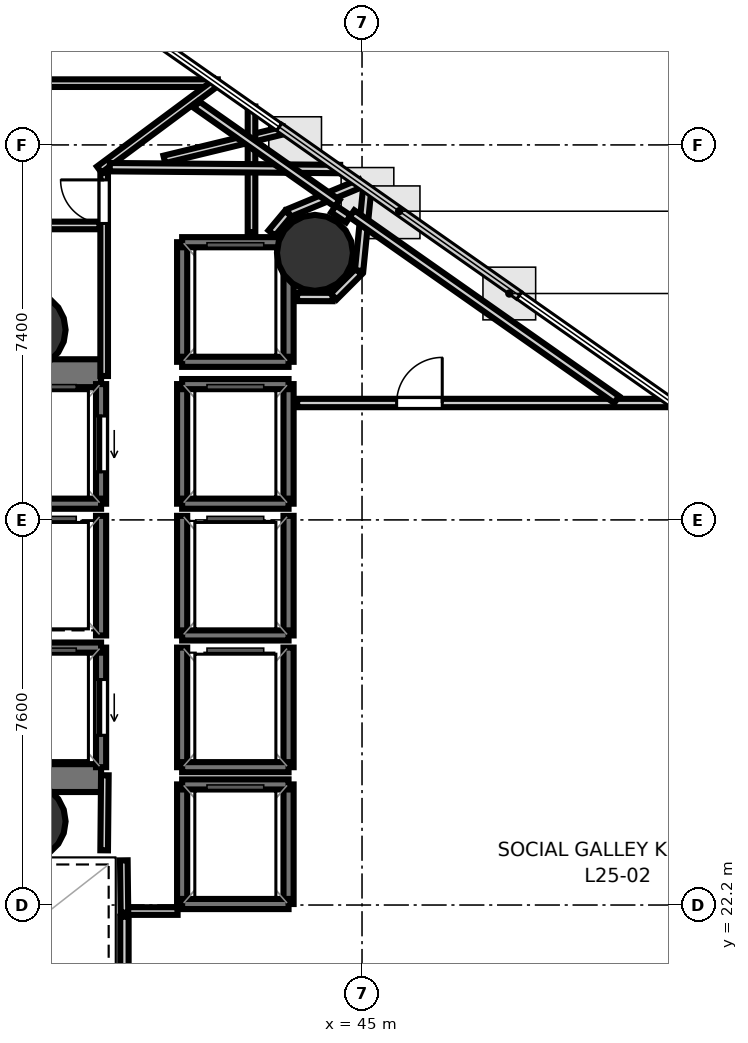
"""IFC4 building model, lengths in metres.
Left out: names, types, materials, properties, quantities, classifications, styles, units other than length and angle.
Written with IfcOpenShell. Run it as: python <this file> out.ifc"""

import sys

from ifc_helpers import new_model, si_unit, direction, frame, frame_2d, origin, origin_2d, place, context, subcontext, project, spatial, rectangle, hollow_circle, extrude, element, fill, save


model = new_model("IFC4")
c1 = context("Model", 3, precision=1e-05, world=origin(), true_north=direction((0.0, 1.0)))
c2 = subcontext(c1, "Body", "Model", "MODEL_VIEW")
j1 = project(units=[si_unit("LENGTHUNIT", "METRE"), si_unit("PLANEANGLEUNIT", "RADIAN")], contexts=[c1])
p1 = place(None, origin())
s1 = spatial("IfcSite", under=j1, at=p1, CompositionType="ELEMENT")
p2 = place(p1, origin())
s2 = spatial("IfcBuilding", under=s1, at=p2, CompositionType="ELEMENT")
p3 = place(p2, frame((0.0, 0.0, 101.5)))
s3 = spatial("IfcBuildingStorey", under=s2, at=p3, CompositionType="ELEMENT", Elevation=101.5)
p4 = place(p3, frame((29.23, 32.695, 0.0), z_axis=(0.0, 0.0, 1.0), x_axis=(1.0, 0.0, 0.0)))
e1 = element("IfcWall", 1, at=p4, inside=s3, PredefinedType="SHEAR", context=c2, shape_type="SweptSolid", body=[
    extrude(rectangle(XDim=10.62, YDim=0.55, at=frame_2d((5.31, 0.0))), origin(), (0.0, 0.0, 1.0), 3.52),
])
p5 = place(p4, frame((0.995, 0.0, 0.0)))
e2 = element("IfcOpeningElement", 2, at=p5, cuts=e1, PredefinedType="OPENING", context=c2, shape_type="SweptSolid", body=[
    extrude(rectangle(XDim=1.25, YDim=2.15, at=frame_2d((0.625, 1.075))), frame((0.0, 0.285, 0.0), z_axis=(0.0, -1.0, 0.0), x_axis=(1.0, 0.0, 0.0)), (0.0, 0.0, 1.0), 0.57),
])
p6 = place(p3, frame((29.23, 24.705, 0.0), z_axis=(0.0, 0.0, 1.0), x_axis=(1.0, 0.0, 0.0)))
e3 = element("IfcWall", 3, at=p6, inside=s3, PredefinedType="SHEAR", context=c2, shape_type="SweptSolid", body=[
    extrude(rectangle(XDim=10.62, YDim=0.55, at=frame_2d((5.31, 0.0))), origin(), (0.0, 0.0, 1.0), 3.52),
])
p7 = place(p6, frame((0.795, 0.0, 0.0)))
e4 = element("IfcOpeningElement", 4, at=p7, cuts=e3, PredefinedType="OPENING", context=c2, shape_type="SweptSolid", body=[
    extrude(rectangle(XDim=1.25, YDim=2.15, at=frame_2d((0.625, 1.075))), frame((0.0, 0.285, 0.0), z_axis=(0.0, -1.0, 0.0), x_axis=(1.0, 0.0, 0.0)), (0.0, 0.0, 1.0), 0.57),
])
for number, where, z_axis, x_axis in (
    (5, (38.4, 33.55, 0.0), (0.0, 0.0, 1.0), (1.0, 0.0, 0.0)),
    (6, (38.4, 23.85, 0.0), (0.0, 0.0, 1.0), (1.0, 0.0, 0.0)),
    (7, (44.071, 35.07, 0.0), (0.0, 0.0, 1.0), (1.0, 0.0, 0.0)),
):
    element("IfcColumn", number, at=place(p3, frame(where, z_axis=z_axis, x_axis=x_axis)), inside=s3, PredefinedType="COLUMN", context=c2, shape_type="SweptSolid", body=[
        extrude(hollow_circle(Radius=0.75, WallThickness=0.036, at=origin_2d()), origin(), (0.0, 0.0, 1.0), 3.7),
    ])
p8 = place(p3, frame((39.85, 30.12, 0.0), z_axis=(0.0, 0.0, 1.0), x_axis=(0.0, 1.0, 0.0)))
e8 = element("IfcWall", 8, at=p8, inside=s3, PredefinedType="SOLIDWALL", context=c2, shape_type="SweptSolid", body=[
    extrude(rectangle(XDim=2.36, YDim=0.2, at=frame_2d((1.18, 0.0))), origin(), (0.0, 0.0, 1.0), 3.52),
])
p9 = place(p8, frame((0.63, 0.0, 0.0)))
e9 = element("IfcOpeningElement", 9, at=p9, cuts=e8, PredefinedType="OPENING", context=c2, shape_type="SweptSolid", body=[
    extrude(rectangle(XDim=1.1, YDim=2.15, at=frame_2d((0.55, 1.075))), frame((0.0, 0.11, 0.0), z_axis=(0.0, -1.0, 0.0), x_axis=(1.0, 0.0, 0.0)), (0.0, 0.0, 1.0), 0.22),
])
p10 = place(p3, frame((37.75, 30.12, 0.0), z_axis=(0.0, 0.0, 1.0), x_axis=(1.0, 0.0, 0.0)))
e10 = element("IfcWall", 10, at=p10, inside=s3, PredefinedType="SOLIDWALL", context=c2, shape_type="SweptSolid", body=[
    extrude(rectangle(XDim=2.1, YDim=0.2, at=frame_2d((1.05, 0.0))), origin(), (0.0, 0.0, 1.0), 3.52),
])
p11 = place(p3, frame((39.85, 24.92, 0.0), z_axis=(0.0, 0.0, 1.0), x_axis=(0.0, 1.0, 0.0)))
e11 = element("IfcWall", 11, at=p11, inside=s3, PredefinedType="SOLIDWALL", context=c2, shape_type="SweptSolid", body=[
    extrude(rectangle(XDim=2.36, YDim=0.2, at=frame_2d((1.18, 0.0))), origin(), (0.0, 0.0, 1.0), 3.52),
])
p12 = place(p11, frame((0.63, 0.0, 0.0)))
e12 = element("IfcOpeningElement", 12, at=p12, cuts=e11, PredefinedType="OPENING", context=c2, shape_type="SweptSolid", body=[
    extrude(rectangle(XDim=1.1, YDim=2.15, at=frame_2d((0.55, 1.075))), frame((0.0, 0.11, 0.0), z_axis=(0.0, -1.0, 0.0), x_axis=(1.0, 0.0, 0.0)), (0.0, 0.0, 1.0), 0.22),
])
p13 = place(p3, frame((37.75, 27.28, 0.0), z_axis=(0.0, 0.0, 1.0), x_axis=(1.0, 0.0, 0.0)))
e13 = element("IfcWall", 13, at=p13, inside=s3, PredefinedType="SOLIDWALL", context=c2, shape_type="SweptSolid", body=[
    extrude(rectangle(XDim=2.1, YDim=0.2, at=frame_2d((1.05, 0.0))), origin(), (0.0, 0.0, 1.0), 3.52),
])
for number, where, z_axis, x_axis in (
    (14, (43.55, 30.12, 0.0), (0.0, 0.0, 1.0), (0.0, 1.0, 0.0)),
    (15, (41.45, 30.12, 0.0), (0.0, 0.0, 1.0), (0.0, 1.0, 0.0)),
):
    element("IfcWall", number, at=place(p3, frame(where, z_axis=z_axis, x_axis=x_axis)), inside=s3, PredefinedType="SOLIDWALL", context=c2, shape_type="SweptSolid", body=[
        extrude(rectangle(XDim=2.36, YDim=0.2, at=frame_2d((1.18, 0.0))), origin(), (0.0, 0.0, 1.0), 3.52),
    ])
for number, where, z_axis, x_axis in (
    (16, (41.45, 32.48, 0.0), (0.0, 0.0, 1.0), (1.0, 0.0, 0.0)),
    (17, (41.45, 30.12, 0.0), (0.0, 0.0, 1.0), (1.0, 0.0, 0.0)),
):
    element("IfcWall", number, at=place(p3, frame(where, z_axis=z_axis, x_axis=x_axis)), inside=s3, PredefinedType="SOLIDWALL", context=c2, shape_type="SweptSolid", body=[
        extrude(rectangle(XDim=2.1, YDim=0.2, at=frame_2d((1.05, 0.0))), origin(), (0.0, 0.0, 1.0), 3.52),
    ])
for number, where, z_axis, x_axis in (
    (18, (43.55, 27.52, 0.0), (0.0, 0.0, 1.0), (0.0, 1.0, 0.0)),
    (19, (41.45, 27.52, 0.0), (0.0, 0.0, 1.0), (0.0, 1.0, 0.0)),
):
    element("IfcWall", number, at=place(p3, frame(where, z_axis=z_axis, x_axis=x_axis)), inside=s3, PredefinedType="SOLIDWALL", context=c2, shape_type="SweptSolid", body=[
        extrude(rectangle(XDim=2.36, YDim=0.2, at=frame_2d((1.18, 0.0))), origin(), (0.0, 0.0, 1.0), 3.52),
    ])
p14 = place(p3, frame((41.45, 27.52, 0.0), z_axis=(0.0, 0.0, 1.0), x_axis=(1.0, 0.0, 0.0)))
e20 = element("IfcWall", 20, at=p14, inside=s3, PredefinedType="SOLIDWALL", context=c2, shape_type="SweptSolid", body=[
    extrude(rectangle(XDim=2.1, YDim=0.2, at=frame_2d((1.05, 0.0))), origin(), (0.0, 0.0, 1.0), 3.52),
])
for number, where, z_axis, x_axis in (
    (21, (43.55, 24.92, 0.0), (0.0, 0.0, 1.0), (0.0, 1.0, 0.0)),
    (22, (41.45, 24.92, 0.0), (0.0, 0.0, 1.0), (0.0, 1.0, 0.0)),
):
    element("IfcWall", number, at=place(p3, frame(where, z_axis=z_axis, x_axis=x_axis)), inside=s3, PredefinedType="SOLIDWALL", context=c2, shape_type="SweptSolid", body=[
        extrude(rectangle(XDim=2.36, YDim=0.2, at=frame_2d((1.18, 0.0))), origin(), (0.0, 0.0, 1.0), 3.52),
    ])
p15 = place(p3, frame((41.45, 24.92, 0.0), z_axis=(0.0, 0.0, 1.0), x_axis=(1.0, 0.0, 0.0)))
e23 = element("IfcWall", 23, at=p15, inside=s3, PredefinedType="SOLIDWALL", context=c2, shape_type="SweptSolid", body=[
    extrude(rectangle(XDim=2.1, YDim=0.2, at=frame_2d((1.05, 0.0))), origin(), (0.0, 0.0, 1.0), 3.52),
])
p16 = place(p3, frame((39.85, 27.52, 0.0), z_axis=(0.0, 0.0, 1.0), x_axis=(0.0, 1.0, 0.0)))
e24 = element("IfcWall", 24, at=p16, inside=s3, PredefinedType="SOLIDWALL", context=c2, shape_type="SweptSolid", body=[
    extrude(rectangle(XDim=2.36, YDim=0.2, at=frame_2d((1.18, 0.0))), origin(), (0.0, 0.0, 1.0), 3.52),
])
for number, where, z_axis, x_axis in (
    (25, (43.55, 22.22, 0.0), (0.0, 0.0, 1.0), (0.0, 1.0, 0.0)),
    (26, (41.45, 22.22, 0.0), (0.0, 0.0, 1.0), (0.0, 1.0, 0.0)),
):
    element("IfcWall", number, at=place(p3, frame(where, z_axis=z_axis, x_axis=x_axis)), inside=s3, PredefinedType="SOLIDWALL", context=c2, shape_type="SweptSolid", body=[
        extrude(rectangle(XDim=2.36, YDim=0.2, at=frame_2d((1.18, 0.0))), origin(), (0.0, 0.0, 1.0), 3.52),
    ])
for number, where, z_axis, x_axis in (
    (27, (41.45, 24.58, 0.0), (0.0, 0.0, 1.0), (1.0, 0.0, 0.0)),
    (28, (41.45, 22.22, 0.0), (0.0, 0.0, 1.0), (1.0, 0.0, 0.0)),
):
    element("IfcWall", number, at=place(p3, frame(where, z_axis=z_axis, x_axis=x_axis)), inside=s3, PredefinedType="SOLIDWALL", context=c2, shape_type="SweptSolid", body=[
        extrude(rectangle(XDim=2.1, YDim=0.2, at=frame_2d((1.05, 0.0))), origin(), (0.0, 0.0, 1.0), 3.52),
    ])
for number, where, z_axis, x_axis in (
    (29, (43.55, 32.92, 0.0), (0.0, 0.0, 1.0), (0.0, 1.0, 0.0)),
    (30, (41.45, 32.92, 0.0), (0.0, 0.0, 1.0), (0.0, 1.0, 0.0)),
):
    element("IfcWall", number, at=place(p3, frame(where, z_axis=z_axis, x_axis=x_axis)), inside=s3, PredefinedType="SOLIDWALL", context=c2, shape_type="SweptSolid", body=[
        extrude(rectangle(XDim=2.36, YDim=0.2, at=frame_2d((1.18, 0.0))), origin(), (0.0, 0.0, 1.0), 3.52),
    ])
for number, where, z_axis, x_axis in (
    (31, (41.45, 35.28, 0.0), (0.0, 0.0, 1.0), (1.0, 0.0, 0.0)),
    (32, (41.45, 32.92, 0.0), (0.0, 0.0, 1.0), (1.0, 0.0, 0.0)),
):
    element("IfcWall", number, at=place(p3, frame(where, z_axis=z_axis, x_axis=x_axis)), inside=s3, PredefinedType="SOLIDWALL", context=c2, shape_type="SweptSolid", body=[
        extrude(rectangle(XDim=2.1, YDim=0.2, at=frame_2d((1.05, 0.0))), origin(), (0.0, 0.0, 1.0), 3.52),
    ])
p17 = place(p3, frame((39.911, 32.64, 0.0), z_axis=(0.0, 0.0, 1.0), x_axis=(0.0, 1.0, 0.0)))
e33 = element("IfcWall", 33, at=p17, inside=s3, PredefinedType="PARTITIONING", context=c2, shape_type="SweptSolid", body=[
    extrude(rectangle(XDim=4.01, YDim=0.15, at=frame_2d((2.005, 0.0))), origin(), (0.0, 0.0, 1.0), 2.84),
])
p18 = place(p17, frame((3.01, 0.0, 0.0)))
e34 = element("IfcOpeningElement", 34, at=p18, cuts=e33, PredefinedType="OPENING", context=c2, shape_type="SweptSolid", body=[
    extrude(rectangle(XDim=0.86, YDim=2.05, at=frame_2d((0.43, 1.025))), frame((0.0, 0.085, 0.0), z_axis=(0.0, -1.0, 0.0), x_axis=(1.0, 0.0, 0.0)), (0.0, 0.0, 1.0), 0.17),
])
p19 = place(p3, frame((41.099, 36.915, 0.0), z_axis=(0.0, 0.0, 1.0), x_axis=(0.971792208063, 0.235838725295, 0.0)))
e35 = element("IfcWall", 35, at=p19, inside=s3, PredefinedType="PARTITIONING", context=c2, shape_type="SweptSolid", body=[
    extrude(rectangle(XDim=2.43, YDim=0.15, at=frame_2d((1.215, 0.0))), origin(), (0.0, 0.0, 1.0), 2.84),
])
p20 = place(p3, frame((42.819, 37.958, 0.0), z_axis=(0.0, 0.0, 1.0), x_axis=(0.0, -1.0, 0.0)))
e36 = element("IfcWall", 36, at=p20, inside=s3, PredefinedType="PARTITIONING", context=c2, shape_type="SweptSolid", body=[
    extrude(rectangle(XDim=2.478, YDim=0.15, at=frame_2d((1.239, 0.0))), origin(), (0.0, 0.0, 1.0), 2.84),
])
p21 = place(p3, frame((41.36, 22.081, 0.0), z_axis=(0.0, 0.0, 1.0), x_axis=(-1.0, 0.0, 0.0)))
e37 = element("IfcWall", 37, at=p21, inside=s3, PredefinedType="PARTITIONING", context=c2, shape_type="SweptSolid", body=[
    extrude(rectangle(XDim=1.08, YDim=0.15, at=frame_2d((0.54, 0.0))), origin(), (0.0, 0.0, 1.0), 2.84),
])
p22 = place(p3, frame((40.311, 22.05, 0.0), z_axis=(0.0, 0.0, 1.0), x_axis=(-0.011836292006, 0.999929948642, 0.0)))
e38 = element("IfcWall", 38, at=p22, inside=s3, PredefinedType="PARTITIONING", context=c2, shape_type="SweptSolid", body=[
    extrude(rectangle(XDim=1.031, YDim=0.15, at=frame_2d((0.516, 0.0))), origin(), (0.0, 0.0, 1.0), 2.84),
])
p23 = place(p3, frame((39.911, 23.28, 0.0), z_axis=(0.0, 0.0, 1.0), x_axis=(0.009397771291, 0.999955839972, 0.0)))
e39 = element("IfcWall", 39, at=p23, inside=s3, PredefinedType="PARTITIONING", context=c2, shape_type="SweptSolid", body=[
    extrude(rectangle(XDim=1.481, YDim=0.15, at=frame_2d((0.74, 0.0))), origin(), (0.0, 0.0, 1.0), 2.84),
])
p24 = place(p3, frame((26.42, 38.419, 0.0), z_axis=(0.0, 0.0, 1.0), x_axis=(1.0, 0.0, 0.0)))
e40 = element("IfcWall", 40, at=p24, inside=s3, PredefinedType="PARTITIONING", context=c2, shape_type="SweptSolid", body=[
    extrude(rectangle(XDim=15.734, YDim=0.15, at=frame_2d((7.867, 0.0))), origin(), (0.0, 0.0, 1.0), 2.84),
])
p25 = place(p24, frame((7.13, 0.0, 0.0)))
e41 = element("IfcOpeningElement", 41, at=p25, cuts=e40, PredefinedType="OPENING", context=c2, shape_type="SweptSolid", body=[
    extrude(rectangle(XDim=0.9, YDim=2.1, at=frame_2d((0.45, 1.05))), frame((0.0, 0.085, 0.0), z_axis=(0.0, -1.0, 0.0), x_axis=(1.0, 0.0, 0.0)), (0.0, 0.0, 1.0), 0.17),
])
p26 = place(p3, frame((42.137, 38.44, 0.0), z_axis=(0.0, 0.0, 1.0), x_axis=(-0.802715001133, -0.596362831635, 0.0)))
e42 = element("IfcWall", 42, at=p26, inside=s3, PredefinedType="PARTITIONING", context=c2, shape_type="SweptSolid", body=[
    extrude(rectangle(XDim=2.894, YDim=0.15, at=frame_2d((1.447, 0.0))), origin(), (0.0, 0.0, 1.0), 2.84),
])
p27 = place(p3, frame((39.818, 35.611, 0.0), z_axis=(0.0, 0.0, 1.0), x_axis=(-1.0, 0.0, 0.0)))
e43 = element("IfcWall", 43, at=p27, inside=s3, PredefinedType="PARTITIONING", context=c2, shape_type="SweptSolid", body=[
    extrude(rectangle(XDim=2.768, YDim=0.15, at=frame_2d((1.384, 0.0))), origin(), (0.0, 0.0, 1.0), 2.84),
])
p28 = place(p3, frame((40.311, 18.0, 0.0), z_axis=(0.0, 0.0, 1.0), x_axis=(0.0, 1.0, 0.0)))
e44 = element("IfcWall", 44, at=p28, inside=s3, PredefinedType="PLUMBINGWALL", context=c2, shape_type="SweptSolid", body=[
    extrude(rectangle(XDim=3.97, YDim=0.165, at=frame_2d((1.985, 0.0))), origin(), (0.0, 0.0, 1.0), 2.84),
])
p29 = place(p3, frame((43.72, 32.107, 0.0), z_axis=(0.0, 0.0, 1.0), x_axis=(1.0, 0.0, 0.0)))
e45 = element("IfcWall", 45, at=p29, inside=s3, PredefinedType="PLUMBINGWALL", context=c2, shape_type="SweptSolid", body=[
    extrude(rectangle(XDim=7.424, YDim=0.165, at=frame_2d((3.712, 0.0))), origin(), (0.0, 0.0, 1.0), 2.84),
])
p30 = place(p29, frame((1.963, 0.0, 0.0)))
e46 = element("IfcOpeningElement", 46, at=p30, cuts=e45, PredefinedType="OPENING", context=c2, shape_type="SweptSolid", body=[
    extrude(rectangle(XDim=0.9, YDim=2.1, at=frame_2d((0.45, 1.05))), frame((0.0, 0.093, 0.0), z_axis=(0.0, -1.0, 0.0), x_axis=(1.0, 0.0, 0.0)), (0.0, 0.0, 1.0), 0.185),
])
p31 = place(p3, frame((43.718, 34.201, 0.0), z_axis=(0.0, 0.0, 1.0), x_axis=(0.999993938262, -0.003481873044, 0.0)))
e47 = element("IfcWall", 47, at=p31, inside=s3, PredefinedType="PLUMBINGWALL", context=c2, shape_type="SweptSolid", body=[
    extrude(rectangle(XDim=0.701, YDim=0.165, at=frame_2d((0.351, 0.0))), origin(), (0.0, 0.0, 1.0), 2.84),
])
p32 = place(p3, frame((44.441, 34.207, 0.0), z_axis=(0.0, 0.0, 1.0), x_axis=(0.707106781187, 0.707106781187, 0.0)))
e48 = element("IfcWall", 48, at=p32, inside=s3, PredefinedType="PLUMBINGWALL", context=c2, shape_type="SweptSolid", body=[
    extrude(rectangle(XDim=0.696, YDim=0.165, at=frame_2d((0.348, 0.0))), origin(), (0.0, 0.0, 1.0), 2.84),
])
p33 = place(p3, frame((44.943, 34.719, 0.0), z_axis=(0.0, 0.0, 1.0), x_axis=(0.09801847971, 0.995184594754, 0.0)))
e49 = element("IfcWall", 49, at=p33, inside=s3, PredefinedType="PLUMBINGWALL", context=c2, shape_type="SweptSolid", body=[
    extrude(rectangle(XDim=1.644, YDim=0.165, at=frame_2d((0.822, 0.0))), origin(), (0.0, 0.0, 1.0), 2.84),
])
p34 = place(p3, frame((44.732, 35.739, 0.0), z_axis=(0.0, 0.0, 1.0), x_axis=(-0.831414960455, 0.555652016582, 0.0)))
e50 = element("IfcWall", 50, at=p34, inside=s3, PredefinedType="PLUMBINGWALL", context=c2, shape_type="SweptSolid", body=[
    extrude(rectangle(XDim=0.355, YDim=0.165, at=frame_2d((0.177, 0.0))), origin(), (0.0, 0.0, 1.0), 2.84),
])
p35 = place(p3, frame((44.975, 36.444, 0.0), z_axis=(0.0, 0.0, 1.0), x_axis=(-0.923821499472, -0.382823506479, 0.0)))
e51 = element("IfcWall", 51, at=p35, inside=s3, PredefinedType="PLUMBINGWALL", context=c2, shape_type="SweptSolid", body=[
    extrude(rectangle(XDim=1.539, YDim=0.165, at=frame_2d((0.77, 0.0))), origin(), (0.0, 0.0, 1.0), 2.84),
])
p36 = place(p3, frame((43.542, 35.846, 0.0), z_axis=(0.0, 0.0, 1.0), x_axis=(-0.641896943682, -0.76679091915, 0.0)))
e52 = element("IfcWall", 52, at=p36, inside=s3, PredefinedType="PLUMBINGWALL", context=c2, shape_type="SweptSolid", body=[
    extrude(rectangle(XDim=0.504, YDim=0.165, at=frame_2d((0.252, 0.0))), origin(), (0.0, 0.0, 1.0), 2.84),
])
p37 = place(p3, frame((44.567, 36.724, 0.0), z_axis=(0.0, 0.0, 1.0), x_axis=(-0.999967122675, 0.008108857501, 0.0)))
e53 = element("IfcWall", 53, at=p37, inside=s3, PredefinedType="PLUMBINGWALL", context=c2, shape_type="SweptSolid", body=[
    extrude(rectangle(XDim=4.546, YDim=0.165, at=frame_2d((2.273, 0.0))), origin(), (0.0, 0.0, 1.0), 2.84),
])
p38 = place(p3, frame((41.734, 37.996, 0.0), z_axis=(0.0, 0.0, 1.0), x_axis=(0.818419506658, -0.574621189239, 0.0)))
e54 = element("IfcWall", 54, at=p38, inside=s3, PredefinedType="PLUMBINGWALL", context=c2, shape_type="SweptSolid", body=[
    extrude(rectangle(XDim=3.392, YDim=0.165, at=frame_2d((1.696, 0.0))), origin(), (0.0, 0.0, 1.0), 2.84),
])
p39 = place(p3, frame((44.801, 35.843, 0.0), z_axis=(0.0, 0.0, 1.0), x_axis=(0.818415320748, -0.574627151085, 0.0)))
e55 = element("IfcWall", 55, at=p39, inside=s3, PredefinedType="PLUMBINGWALL", context=c2, shape_type="SweptSolid", body=[
    extrude(rectangle(XDim=6.383, YDim=0.165, at=frame_2d((3.192, 0.0))), origin(), (0.0, 0.0, 1.0), 2.84),
])
p40 = place(p9, origin())
e56 = element("IfcDoor", 56, at=p40, inside=s3, OperationType="SLIDING_TO_LEFT", PredefinedType="DOOR", context=c2, shape_type="SweptSolid", body=[
    extrude(rectangle(XDim=1.1, YDim=2.15, at=frame_2d((0.55, 1.075))), frame((0.0, 0.025, 0.0), z_axis=(0.0, -1.0, 0.0), x_axis=(1.0, 0.0, 0.0)), (0.0, 0.0, 1.0), 0.05),
])
fill(e9, e56)
p41 = place(p12, origin())
e57 = element("IfcDoor", 57, at=p41, inside=s3, OperationType="SLIDING_TO_LEFT", PredefinedType="DOOR", context=c2, shape_type="SweptSolid", body=[
    extrude(rectangle(XDim=1.1, YDim=2.15, at=frame_2d((0.55, 1.075))), frame((0.0, 0.025, 0.0), z_axis=(0.0, -1.0, 0.0), x_axis=(1.0, 0.0, 0.0)), (0.0, 0.0, 1.0), 0.05),
])
fill(e12, e57)
p42 = place(p18, origin())
e58 = element("IfcDoor", 58, at=p42, inside=s3, OperationType="SINGLE_SWING_RIGHT", PredefinedType="DOOR", context=c2, shape_type="SweptSolid", body=[
    extrude(rectangle(XDim=0.86, YDim=2.05, at=frame_2d((0.43, 1.025))), frame((0.0, 0.025, 0.0), z_axis=(0.0, -1.0, 0.0), x_axis=(1.0, 0.0, 0.0)), (0.0, 0.0, 1.0), 0.05),
])
fill(e34, e58)
p43 = place(p30, origin())
e59 = element("IfcDoor", 59, at=p43, inside=s3, OperationType="SINGLE_SWING_RIGHT", PredefinedType="DOOR", context=c2, shape_type="SweptSolid", body=[
    extrude(rectangle(XDim=0.9, YDim=2.1, at=frame_2d((0.45, 1.05))), frame((0.0, 0.025, 0.0), z_axis=(0.0, -1.0, 0.0), x_axis=(1.0, 0.0, 0.0)), (0.0, 0.0, 1.0), 0.05),
])
fill(e46, e59)
save(model, sys.argv[1])
